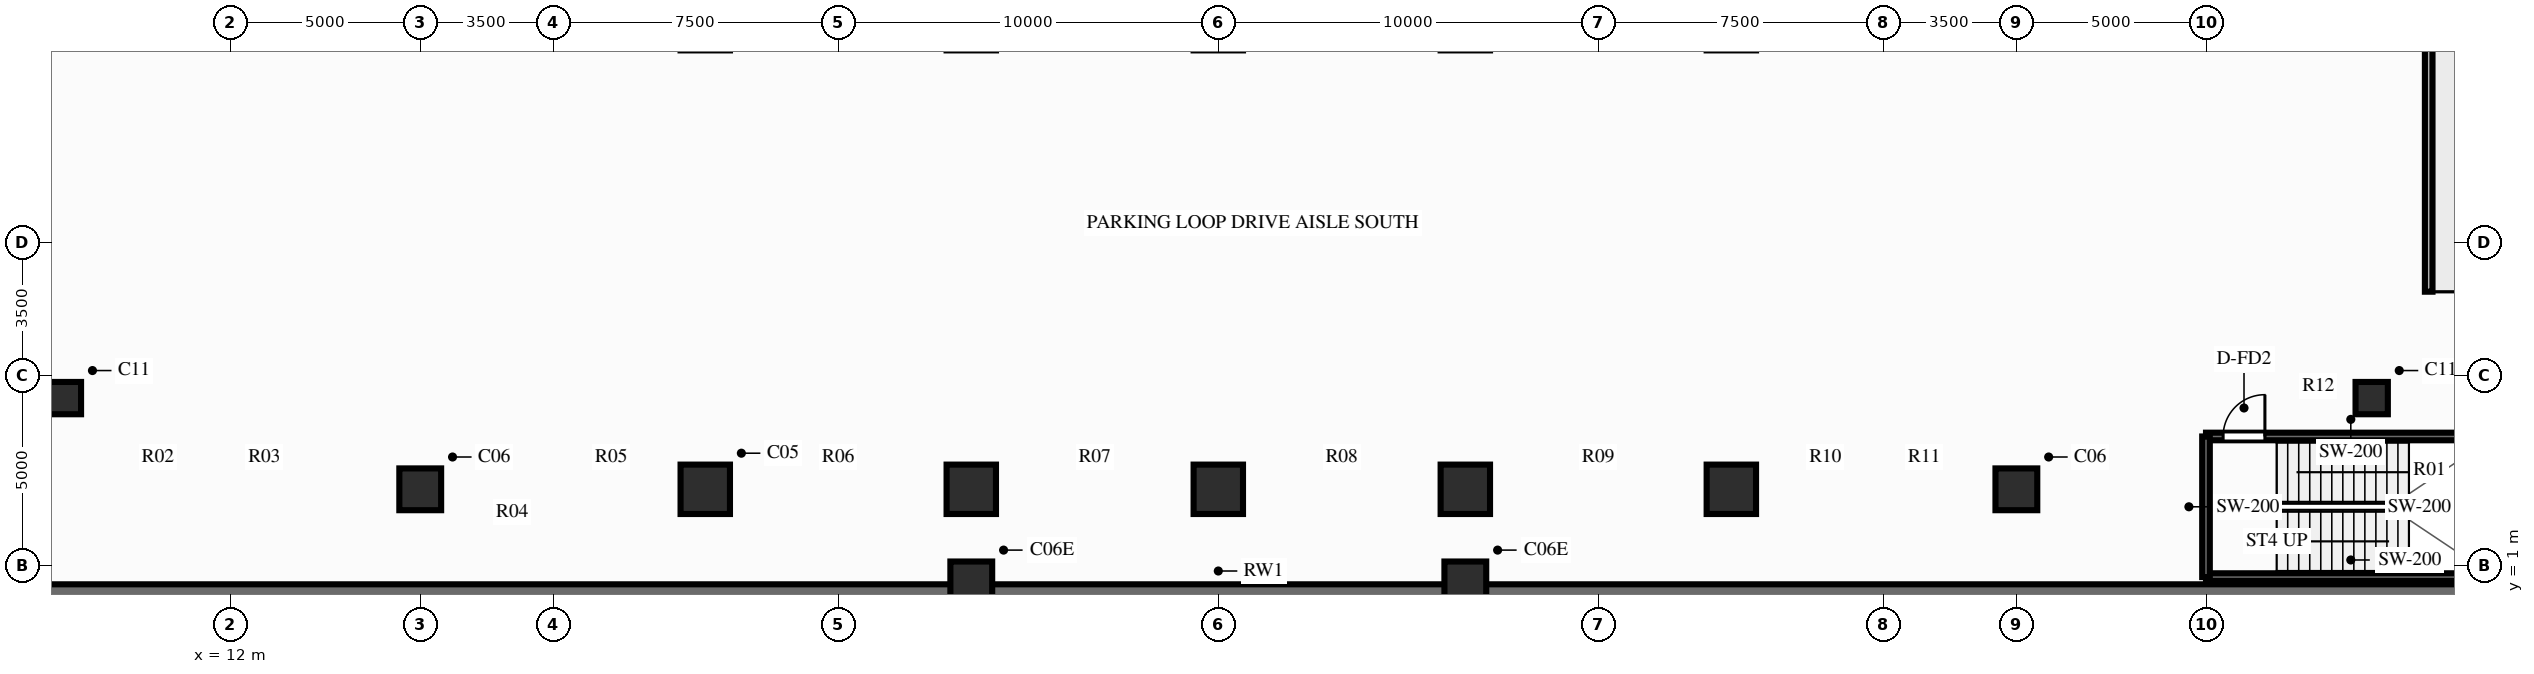
"""IFC4 building model, lengths in metres.
Left out: names, types, materials, properties, quantities, classifications, styles, units other than length and angle.
Written with IfcOpenShell. Run it as: python <this file> out.ifc"""

import sys

from ifc_helpers import new_model, si_unit, direction, frame, frame_2d, origin, origin_2d, place, context, subcontext, project, spatial, rectangle, circle, extrude, source, transform, mapped, element, fill, save


model = new_model("IFC4")
c1 = context("Model", 3, precision=1e-05, world=origin(), true_north=direction((0.0, 1.0)))
c2 = subcontext(c1, "Body", "Model", "MODEL_VIEW")
j1 = project(units=[si_unit("LENGTHUNIT", "METRE"), si_unit("PLANEANGLEUNIT", "RADIAN")], contexts=[c1])
p1 = place(None, origin())
s1 = spatial("IfcSite", under=j1, at=p1, CompositionType="ELEMENT")
p2 = place(p1, origin())
s2 = spatial("IfcBuilding", under=s1, at=p2, CompositionType="ELEMENT")
p3 = place(p2, frame((0.0, 0.0, -4.6)))
s3 = spatial("IfcBuildingStorey", under=s2, at=p3, CompositionType="ELEMENT", Elevation=-4.6)
p4 = place(p3, frame((0.25, 0.25, 0.0), z_axis=(0.0, 0.0, 1.0), x_axis=(1.0, 0.0, 0.0)))
e1 = element("IfcWall", 1, at=p4, inside=s3, PredefinedType="USERDEFINED", context=c2, shape_type="SweptSolid", body=[
    extrude(rectangle(XDim=75.5, YDim=0.5, at=frame_2d((37.75, 0.0))), origin(), (0.0, 0.0, 1.0), 4.6),
])
m1 = source(origin(), c2, "Body", "SweptSolid", [
    extrude(circle(Radius=0.425, at=origin_2d()), origin(), (0.0, 0.0, 1.0), 4.6),
])
for number, where, z_axis, x_axis in (
    (2, (7.65, 5.4, 0.0), (0.0, 0.0, 1.0), (1.0, 0.0, 0.0)),
    (3, (68.35, 5.4, 0.0), (0.0, 0.0, 1.0), (1.0, 0.0, 0.0)),
):
    element("IfcColumn", number, at=place(p3, frame(where, z_axis=z_axis, x_axis=x_axis)), inside=s3, PredefinedType="COLUMN", context=c2, shape_type="MappedRepresentation", body=[
        mapped(m1, transform((0.0, 0.0, 0.0), scale=1.0)),
    ])
m2 = source(origin(), c2, "Body", "SweptSolid", [
    extrude(rectangle(XDim=1.1, YDim=1.1, at=origin_2d()), origin(), (0.0, 0.0, 1.0), 4.6),
])
for number, where, z_axis, x_axis in (
    (4, (17.0, 3.0, 0.0), (0.0, 0.0, 1.0), (1.0, 0.0, 0.0)),
    (5, (59.0, 3.0, 0.0), (0.0, 0.0, 1.0), (1.0, 0.0, 0.0)),
):
    element("IfcColumn", number, at=place(p3, frame(where, z_axis=z_axis, x_axis=x_axis)), inside=s3, PredefinedType="COLUMN", context=c2, shape_type="MappedRepresentation", body=[
        mapped(m2, transform((0.0, 0.0, 0.0), scale=1.0)),
    ])
m3 = source(origin(), c2, "Body", "SweptSolid", [
    extrude(rectangle(XDim=1.3, YDim=1.3, at=origin_2d()), origin(), (0.0, 0.0, 1.0), 4.6),
])
p5 = place(p3, frame((24.5, 3.0, 0.0), z_axis=(0.0, 0.0, 1.0), x_axis=(1.0, 0.0, 0.0)))
e6 = element("IfcColumn", 6, at=p5, inside=s3, PredefinedType="COLUMN", context=c2, shape_type="MappedRepresentation", body=[
    mapped(m3, transform((0.0, 0.0, 0.0), scale=1.0)),
])
p6 = place(p3, frame((31.5, 0.55, 0.0), z_axis=(0.0, 0.0, 1.0), x_axis=(1.0, 0.0, 0.0)))
e7 = element("IfcColumn", 7, at=p6, inside=s3, PredefinedType="COLUMN", context=c2, shape_type="MappedRepresentation", body=[
    mapped(m2, transform((0.0, 0.0, 0.0), scale=1.0)),
])
for number, where, z_axis, x_axis in (
    (8, (31.5, 3.0, 0.0), (0.0, 0.0, 1.0), (1.0, 0.0, 0.0)),
    (9, (38.0, 3.0, 0.0), (0.0, 0.0, 1.0), (1.0, 0.0, 0.0)),
):
    element("IfcColumn", number, at=place(p3, frame(where, z_axis=z_axis, x_axis=x_axis)), inside=s3, PredefinedType="COLUMN", context=c2, shape_type="MappedRepresentation", body=[
        mapped(m3, transform((0.0, 0.0, 0.0), scale=1.0)),
    ])
p7 = place(p3, frame((44.5, 0.55, 0.0), z_axis=(0.0, 0.0, 1.0), x_axis=(1.0, 0.0, 0.0)))
e10 = element("IfcColumn", 10, at=p7, inside=s3, PredefinedType="COLUMN", context=c2, shape_type="MappedRepresentation", body=[
    mapped(m2, transform((0.0, 0.0, 0.0), scale=1.0)),
])
for number, where, z_axis, x_axis in (
    (11, (44.5, 3.0, 0.0), (0.0, 0.0, 1.0), (1.0, 0.0, 0.0)),
    (12, (51.5, 3.0, 0.0), (0.0, 0.0, 1.0), (1.0, 0.0, 0.0)),
):
    element("IfcColumn", number, at=place(p3, frame(where, z_axis=z_axis, x_axis=x_axis)), inside=s3, PredefinedType="COLUMN", context=c2, shape_type="MappedRepresentation", body=[
        mapped(m3, transform((0.0, 0.0, 0.0), scale=1.0)),
    ])
p8 = place(p3, frame((63.99, 0.69, 0.0), z_axis=(0.0, 0.0, 1.0), x_axis=(1.0, 0.0, 0.0)))
e13 = element("IfcWall", 13, at=p8, inside=s3, PredefinedType="SOLIDWALL", context=c2, shape_type="SweptSolid", body=[
    extrude(rectangle(XDim=7.62, YDim=0.2, at=frame_2d((3.81, 0.0))), origin(), (0.0, 0.0, 1.0), 4.32),
])
p9 = place(p3, frame((63.99, 4.39, 0.0), z_axis=(0.0, 0.0, 1.0), x_axis=(1.0, 0.0, 0.0)))
e14 = element("IfcWall", 14, at=p9, inside=s3, PredefinedType="SOLIDWALL", context=c2, shape_type="SweptSolid", body=[
    extrude(rectangle(XDim=7.62, YDim=0.2, at=frame_2d((3.81, 0.0))), origin(), (0.0, 0.0, 1.0), 4.32),
])
p10 = place(p9, frame((0.45, 0.0, 0.0)))
e15 = element("IfcOpeningElement", 15, at=p10, cuts=e14, PredefinedType="OPENING", context=c2, shape_type="SweptSolid", body=[
    extrude(rectangle(XDim=1.1, YDim=2.15, at=frame_2d((0.55, 1.075))), frame((0.0, 0.112, 0.0), z_axis=(0.0, -1.0, 0.0), x_axis=(1.0, 0.0, 0.0)), (0.0, 0.0, 1.0), 0.224),
])
p11 = place(p3, frame((63.99, 0.69, 0.0), z_axis=(0.0, 0.0, 1.0), x_axis=(0.0, 1.0, 0.0)))
e16 = element("IfcWall", 16, at=p11, inside=s3, PredefinedType="SOLIDWALL", context=c2, shape_type="SweptSolid", body=[
    extrude(rectangle(XDim=3.7, YDim=0.2, at=frame_2d((1.85, 0.0))), origin(), (0.0, 0.0, 1.0), 4.32),
])
p12 = place(p3, frame((69.85, 8.2, 0.0), z_axis=(0.0, 0.0, 1.0), x_axis=(0.0, 1.0, 0.0)))
e17 = element("IfcWall", 17, at=p12, inside=s3, PredefinedType="PARTITIONING", context=c2, shape_type="SweptSolid", body=[
    extrude(rectangle(XDim=31.6, YDim=0.2, at=frame_2d((15.8, 0.0))), origin(), (0.0, 0.0, 1.0), 4.32),
])
m4 = source(origin(), c2, "Body", "SweptSolid", [
    extrude(rectangle(XDim=1.1, YDim=2.15, at=frame_2d((0.55, 1.075))), frame((0.0, 0.025, 0.0), z_axis=(0.0, -1.0, 0.0), x_axis=(1.0, 0.0, 0.0)), (0.0, 0.0, 1.0), 0.05),
])
p13 = place(p10, origin())
e18 = element("IfcDoor", 18, at=p13, inside=s3, OperationType="SINGLE_SWING_RIGHT", PredefinedType="DOOR", context=c2, shape_type="MappedRepresentation", body=[
    mapped(m4, transform((0.0, 0.0, 0.0), scale=1.0)),
])
fill(e15, e18)
save(model, sys.argv[1])
